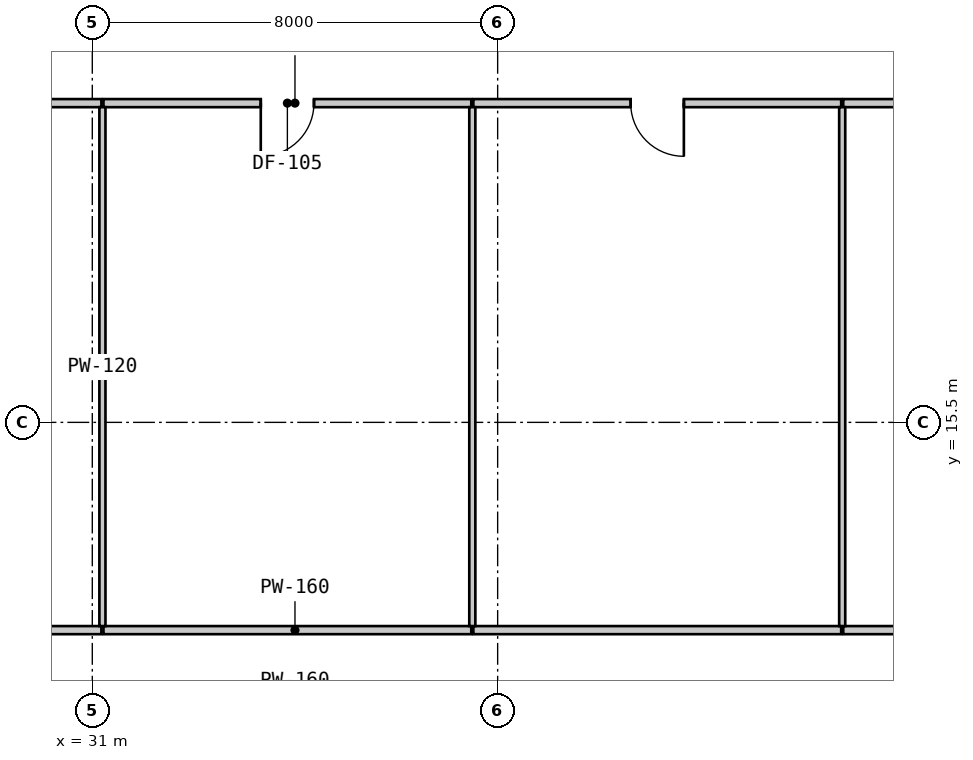
"""IFC4 building model, lengths in metres.
Left out: names, types, materials, properties, quantities, classifications, styles, units other than length and angle.
Written with IfcOpenShell. Run it as: python <this file> out.ifc"""

import sys

from ifc_helpers import new_model, si_unit, direction, frame, frame_2d, origin, place, context, subcontext, project, spatial, rectangle, extrude, source, transform, mapped, element, fill, save


model = new_model("IFC4")
c1 = context("Model", 3, precision=1e-05, world=origin(), true_north=direction((0.0, 1.0)))
c2 = subcontext(c1, "Body", "Model", "MODEL_VIEW")
j1 = project(units=[si_unit("LENGTHUNIT", "METRE"), si_unit("PLANEANGLEUNIT", "RADIAN")], contexts=[c1])
p1 = place(None, origin())
s1 = spatial("IfcSite", under=j1, at=p1, CompositionType="ELEMENT")
p2 = place(p1, origin())
s2 = spatial("IfcBuilding", under=s1, at=p2, CompositionType="ELEMENT")
p3 = place(p2, frame((0.0, 0.0, 93.45)))
s3 = spatial("IfcBuildingStorey", under=s2, at=p3, CompositionType="ELEMENT", Elevation=93.45)
m1 = source(origin(), c2, "Body", "SweptSolid", [
    extrude(rectangle(XDim=7.159, YDim=0.16, at=frame_2d((3.58, 0.0))), origin(), (0.0, 0.0, 1.0), 2.93),
])
p4 = place(p3, frame((31.18, 21.8, 0.0), z_axis=(0.0, 0.0, 1.0), x_axis=(-1.0, 0.0, 0.0)))
e1 = element("IfcWall", 1, at=p4, inside=s3, PredefinedType="PARTITIONING", context=c2, shape_type="MappedRepresentation", body=[
    mapped(m1, transform((0.0, 0.0, 0.0), scale=1.0)),
])
m2 = source(origin(), c2, "Body", "SweptSolid", [
    extrude(rectangle(XDim=1.05, YDim=2.1, at=frame_2d((0.525, 1.05))), frame((0.0, 0.09, 0.0), z_axis=(0.0, -1.0, 0.0), x_axis=(1.0, 0.0, 0.0)), (0.0, 0.0, 1.0), 0.18),
])
p5 = place(p4, frame((3.055, 0.0, 0.0)))
e2 = element("IfcOpeningElement", 2, at=p5, cuts=e1, PredefinedType="OPENING", context=c2, shape_type="MappedRepresentation", body=[
    mapped(m2, transform((0.0, 0.0, 0.0), scale=1.0)),
])
m3 = source(origin(), c2, "Body", "SweptSolid", [
    extrude(rectangle(XDim=7.26, YDim=0.16, at=frame_2d((3.63, 0.0))), origin(), (0.0, 0.0, 1.0), 2.93),
])
p6 = place(p3, frame((38.48, 21.8, 0.0), z_axis=(0.0, 0.0, 1.0), x_axis=(-1.0, 0.0, 0.0)))
e3 = element("IfcWall", 3, at=p6, inside=s3, PredefinedType="PARTITIONING", context=c2, shape_type="MappedRepresentation", body=[
    mapped(m3, transform((0.0, 0.0, 0.0), scale=1.0)),
])
p7 = place(p6, frame((3.105, 0.0, 0.0)))
e4 = element("IfcOpeningElement", 4, at=p7, cuts=e3, PredefinedType="OPENING", context=c2, shape_type="MappedRepresentation", body=[
    mapped(m2, transform((0.0, 0.0, 0.0), scale=1.0)),
])
p8 = place(p3, frame((45.78, 21.8, 0.0), z_axis=(0.0, 0.0, 1.0), x_axis=(-1.0, 0.0, 0.0)))
e5 = element("IfcWall", 5, at=p8, inside=s3, PredefinedType="PARTITIONING", context=c2, shape_type="MappedRepresentation", body=[
    mapped(m3, transform((0.0, 0.0, 0.0), scale=1.0)),
])
p9 = place(p8, frame((3.105, 0.0, 0.0)))
e6 = element("IfcOpeningElement", 6, at=p9, cuts=e5, PredefinedType="OPENING", context=c2, shape_type="MappedRepresentation", body=[
    mapped(m2, transform((0.0, 0.0, 0.0), scale=1.0)),
])
m4 = source(origin(), c2, "Body", "SweptSolid", [
    extrude(rectangle(XDim=7.359, YDim=0.16, at=frame_2d((3.68, 0.0))), origin(), (0.0, 0.0, 1.0), 2.93),
])
p10 = place(p3, frame((53.18, 21.8, 0.0), z_axis=(0.0, 0.0, 1.0), x_axis=(-1.0, 0.0, 0.0)))
e7 = element("IfcWall", 7, at=p10, inside=s3, PredefinedType="PARTITIONING", context=c2, shape_type="MappedRepresentation", body=[
    mapped(m4, transform((0.0, 0.0, 0.0), scale=1.0)),
])
p11 = place(p3, frame((24.02, 11.4, 0.0), z_axis=(0.0, 0.0, 1.0), x_axis=(1.0, 0.0, 0.0)))
e8 = element("IfcWall", 8, at=p11, inside=s3, PredefinedType="PARTITIONING", context=c2, shape_type="MappedRepresentation", body=[
    mapped(m1, transform((0.0, 0.0, 0.0), scale=1.0)),
])
for number, where, z_axis, x_axis in (
    (9, (31.22, 11.4, 0.0), (0.0, 0.0, 1.0), (1.0, 0.0, 0.0)),
    (10, (38.52, 11.4, 0.0), (0.0, 0.0, 1.0), (1.0, 0.0, 0.0)),
):
    element("IfcWall", number, at=place(p3, frame(where, z_axis=z_axis, x_axis=x_axis)), inside=s3, PredefinedType="PARTITIONING", context=c2, shape_type="MappedRepresentation", body=[
        mapped(m3, transform((0.0, 0.0, 0.0), scale=1.0)),
    ])
m5 = source(origin(), c2, "Body", "SweptSolid", [
    extrude(rectangle(XDim=7.3, YDim=0.16, at=frame_2d((3.65, 0.0))), origin(), (0.0, 0.0, 1.0), 2.93),
])
p12 = place(p3, frame((45.82, 11.4, 0.0), z_axis=(0.0, 0.0, 1.0), x_axis=(1.0, 0.0, 0.0)))
e11 = element("IfcWall", 11, at=p12, inside=s3, PredefinedType="PARTITIONING", context=c2, shape_type="MappedRepresentation", body=[
    mapped(m5, transform((0.0, 0.0, 0.0), scale=1.0)),
])
m6 = source(origin(), c2, "Body", "SweptSolid", [
    extrude(rectangle(XDim=10.24, YDim=0.12, at=frame_2d((5.12, 0.0))), origin(), (0.0, 0.0, 1.0), 2.93),
])
for number, where, z_axis, x_axis in (
    (12, (31.2, 21.72, 0.0), (0.0, 0.0, 1.0), (0.0, -1.0, 0.0)),
    (13, (38.5, 21.72, 0.0), (0.0, 0.0, 1.0), (0.0, -1.0, 0.0)),
    (14, (45.8, 21.72, 0.0), (0.0, 0.0, 1.0), (0.0, -1.0, 0.0)),
):
    element("IfcWall", number, at=place(p3, frame(where, z_axis=z_axis, x_axis=x_axis)), inside=s3, PredefinedType="PARTITIONING", context=c2, shape_type="MappedRepresentation", body=[
        mapped(m6, transform((0.0, 0.0, 0.0), scale=1.0)),
    ])
m7 = source(origin(), c2, "Body", "SweptSolid", [
    extrude(rectangle(XDim=1.05, YDim=2.1, at=frame_2d((0.525, 1.05))), frame((0.0, 0.025, 0.0), z_axis=(0.0, -1.0, 0.0), x_axis=(1.0, 0.0, 0.0)), (0.0, 0.0, 1.0), 0.05),
])
p13 = place(p7, origin())
e15 = element("IfcDoor", 15, at=p13, inside=s3, OperationType="SINGLE_SWING_RIGHT", PredefinedType="DOOR", context=c2, shape_type="MappedRepresentation", body=[
    mapped(m7, transform((0.0, 0.0, 0.0), scale=1.0)),
])
fill(e4, e15)
p14 = place(p9, origin())
e16 = element("IfcDoor", 16, at=p14, inside=s3, OperationType="SINGLE_SWING_LEFT", PredefinedType="DOOR", context=c2, shape_type="MappedRepresentation", body=[
    mapped(m7, transform((0.0, 0.0, 0.0), scale=1.0)),
])
fill(e6, e16)
save(model, sys.argv[1])
